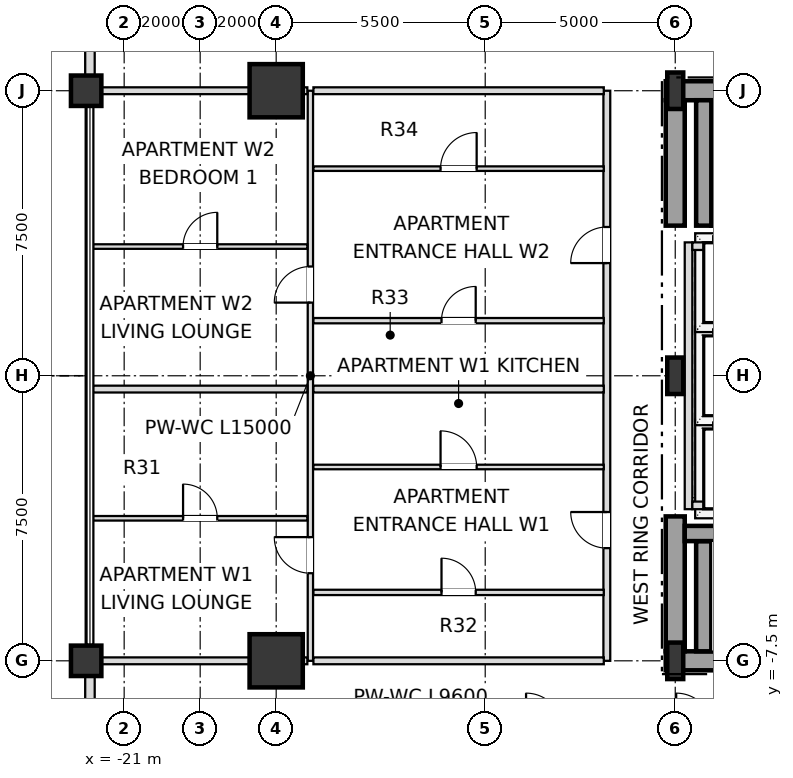
"""IFC4 building model, lengths in metres.
Left out: names, types, materials, properties, quantities, classifications, styles, units other than length and angle.
Written with IfcOpenShell. Run it as: python <this file> out.ifc"""

import sys

from ifc_helpers import new_model, si_unit, direction, frame, frame_2d, origin, origin_2d, place, context, subcontext, project, spatial, rectangle, i_section, extrude, element, fill, save


model = new_model("IFC4")
c1 = context("Model", 3, precision=1e-05, world=origin(), true_north=direction((0.0, 1.0)))
c2 = subcontext(c1, "Body", "Model", "MODEL_VIEW")
j1 = project(units=[si_unit("LENGTHUNIT", "METRE"), si_unit("PLANEANGLEUNIT", "RADIAN")], contexts=[c1])
p1 = place(None, origin())
s1 = spatial("IfcSite", under=j1, at=p1, CompositionType="ELEMENT")
p2 = place(p1, origin())
s2 = spatial("IfcBuilding", under=s1, at=p2, CompositionType="ELEMENT")
p3 = place(p2, frame((0.0, 0.0, 27.6)))
s3 = spatial("IfcBuildingStorey", under=s2, at=p3, CompositionType="ELEMENT", Elevation=27.6)
for number, where, z_axis, x_axis in (
    (1, (-6.5, -7.5, 0.0), (0.0, 0.0, 1.0), (1.0, 0.0, 0.0)),
    (2, (-6.5, 0.0, 0.0), (0.0, 0.0, 1.0), (1.0, 0.0, 0.0)),
    (3, (-6.5, 7.5, 0.0), (0.0, 0.0, 1.0), (1.0, 0.0, 0.0)),
):
    element("IfcColumn", number, at=place(p3, frame(where, z_axis=z_axis, x_axis=x_axis)), inside=s3, PredefinedType="COLUMN", context=c2, shape_type="SweptSolid", body=[
        extrude(i_section(OverallWidth=0.42, OverallDepth=0.96, WebThickness=0.022, FlangeThickness=0.034, at=origin_2d()), origin(), (0.0, 0.0, 1.0), 4.8),
    ])
for number, where, z_axis, x_axis in (
    (4, (-17.0, 7.5, 0.0), (0.0, 0.0, 1.0), (1.0, 0.0, 0.0)),
    (5, (-17.0, -7.5, 0.0), (0.0, 0.0, 1.0), (1.0, 0.0, 0.0)),
):
    element("IfcColumn", number, at=place(p3, frame(where, z_axis=z_axis, x_axis=x_axis)), inside=s3, PredefinedType="USERDEFINED", context=c2, shape_type="SweptSolid", body=[
        extrude(rectangle(XDim=1.4, YDim=1.4, at=origin_2d()), origin(), (0.0, 0.0, 1.0), 4.8),
    ])
for number, where, z_axis, x_axis in (
    (6, (-22.0, -7.5, 0.0), (0.0, 0.0, 1.0), (1.0, 0.0, 0.0)),
    (7, (-22.0, 7.5, 0.0), (0.0, 0.0, 1.0), (1.0, 0.0, 0.0)),
):
    element("IfcColumn", number, at=place(p3, frame(where, z_axis=z_axis, x_axis=x_axis)), inside=s3, PredefinedType="COLUMN", context=c2, shape_type="SweptSolid", body=[
        extrude(rectangle(XDim=0.8, YDim=0.8, at=origin_2d()), origin(), (0.0, 0.0, 1.0), 4.8),
    ])
p4 = place(p3, frame((-21.9, 12.605, 0.0), z_axis=(0.0, 0.0, 1.0), x_axis=(0.0, -1.0, 0.0)))
e8 = element("IfcWall", 8, at=p4, inside=s3, PredefinedType="SOLIDWALL", context=c2, shape_type="SweptSolid", body=[
    extrude(rectangle(XDim=4.71, YDim=0.25, at=frame_2d((2.355, 0.0))), origin(), (0.0, 0.0, 1.0), 3.936),
])
p5 = place(p4, frame((1.455, 0.0, 0.72)))
e9 = element("IfcOpeningElement", 9, at=p5, cuts=e8, PredefinedType="OPENING", context=c2, shape_type="SweptSolid", body=[
    extrude(rectangle(XDim=1.8, YDim=1.68, at=frame_2d((0.9, 0.84))), frame((0.0, 0.135, 0.0), z_axis=(0.0, -1.0, 0.0), x_axis=(1.0, 0.0, 0.0)), (0.0, 0.0, 1.0), 0.27),
])
p6 = place(p3, frame((-21.9, -7.895, 0.0), z_axis=(0.0, 0.0, 1.0), x_axis=(0.0, -1.0, 0.0)))
e10 = element("IfcWall", 10, at=p6, inside=s3, PredefinedType="SOLIDWALL", context=c2, shape_type="SweptSolid", body=[
    extrude(rectangle(XDim=4.71, YDim=0.25, at=frame_2d((2.355, 0.0))), origin(), (0.0, 0.0, 1.0), 3.936),
])
p7 = place(p6, frame((1.455, 0.0, 0.72)))
e11 = element("IfcOpeningElement", 11, at=p7, cuts=e10, PredefinedType="OPENING", context=c2, shape_type="SweptSolid", body=[
    extrude(rectangle(XDim=1.8, YDim=1.68, at=frame_2d((0.9, 0.84))), frame((0.0, 0.135, 0.0), z_axis=(0.0, -1.0, 0.0), x_axis=(1.0, 0.0, 0.0)), (0.0, 0.0, 1.0), 0.27),
])
p8 = place(p3, frame((-6.75, -7.5, 0.0), z_axis=(0.0, 0.0, 1.0), x_axis=(1.0, 0.0, 0.0)))
e12 = element("IfcWall", 12, at=p8, inside=s3, PredefinedType="SHEAR", context=c2, shape_type="SweptSolid", body=[
    extrude(rectangle(XDim=6.75, YDim=0.5, at=frame_2d((3.375, 0.0))), origin(), (0.0, 0.0, 1.0), 4.58),
])
p9 = place(p3, frame((-6.75, 7.5, 0.0), z_axis=(0.0, 0.0, 1.0), x_axis=(1.0, 0.0, 0.0)))
e13 = element("IfcWall", 13, at=p9, inside=s3, PredefinedType="SHEAR", context=c2, shape_type="SweptSolid", body=[
    extrude(rectangle(XDim=6.75, YDim=0.5, at=frame_2d((3.375, 0.0))), origin(), (0.0, 0.0, 1.0), 4.58),
])
p10 = place(p9, frame((1.65, 0.0, 0.0)))
e14 = element("IfcOpeningElement", 14, at=p10, cuts=e13, PredefinedType="OPENING", context=c2, shape_type="SweptSolid", body=[
    extrude(rectangle(XDim=1.05, YDim=2.15, at=frame_2d((0.525, 1.075))), frame((0.0, 0.26, 0.0), z_axis=(0.0, -1.0, 0.0), x_axis=(1.0, 0.0, 0.0)), (0.0, 0.0, 1.0), 0.52),
])
p11 = place(p3, frame((-6.5, -7.25, 0.0), z_axis=(0.0, 0.0, 1.0), x_axis=(0.0, 1.0, 0.0)))
e15 = element("IfcWall", 15, at=p11, inside=s3, PredefinedType="SHEAR", context=c2, shape_type="SweptSolid", body=[
    extrude(rectangle(XDim=3.55, YDim=0.5, at=frame_2d((1.775, 0.0))), origin(), (0.0, 0.0, 1.0), 4.58),
])
p12 = place(p3, frame((-6.5, 3.95, 0.0), z_axis=(0.0, 0.0, 1.0), x_axis=(0.0, 1.0, 0.0)))
e16 = element("IfcWall", 16, at=p12, inside=s3, PredefinedType="SHEAR", context=c2, shape_type="SweptSolid", body=[
    extrude(rectangle(XDim=3.3, YDim=0.5, at=frame_2d((1.65, 0.0))), origin(), (0.0, 0.0, 1.0), 4.58),
])
p13 = place(p3, frame((-5.75, -7.25, 0.0), z_axis=(0.0, 0.0, 1.0), x_axis=(0.0, 1.0, 0.0)))
e17 = element("IfcWall", 17, at=p13, inside=s3, PredefinedType="SHEAR", context=c2, shape_type="SweptSolid", body=[
    extrude(rectangle(XDim=2.9, YDim=0.4, at=frame_2d((1.45, 0.0))), origin(), (0.0, 0.0, 1.0), 4.58),
])
p14 = place(p3, frame((-6.25, -4.15, 0.0), z_axis=(0.0, 0.0, 1.0), x_axis=(1.0, 0.0, 0.0)))
e18 = element("IfcWall", 18, at=p14, inside=s3, PredefinedType="SHEAR", context=c2, shape_type="SweptSolid", body=[
    extrude(rectangle(XDim=7.78, YDim=0.4, at=frame_2d((3.89, 0.0))), origin(), (0.0, 0.0, 1.0), 4.58),
])
p15 = place(p3, frame((-5.55, 4.15, 0.0), z_axis=(0.0, 0.0, 1.0), x_axis=(1.0, 0.0, 0.0)))
e19 = element("IfcWall", 19, at=p15, inside=s3, PredefinedType="SHEAR", context=c2, shape_type="SweptSolid", body=[
    extrude(rectangle(XDim=7.08, YDim=0.4, at=frame_2d((3.54, 0.0))), origin(), (0.0, 0.0, 1.0), 4.58),
])
p16 = place(p3, frame((-5.75, 3.95, 0.0), z_axis=(0.0, 0.0, 1.0), x_axis=(0.0, 1.0, 0.0)))
e20 = element("IfcWall", 20, at=p16, inside=s3, PredefinedType="SHEAR", context=c2, shape_type="SweptSolid", body=[
    extrude(rectangle(XDim=3.3, YDim=0.4, at=frame_2d((1.65, 0.0))), origin(), (0.0, 0.0, 1.0), 4.58),
])
p17 = place(p3, frame((-6.15, -3.51, 0.0), z_axis=(0.0, 0.0, 1.0), x_axis=(0.0, 1.0, 0.0)))
e21 = element("IfcWall", 21, at=p17, inside=s3, PredefinedType="SOLIDWALL", context=c2, shape_type="SweptSolid", body=[
    extrude(rectangle(XDim=7.02, YDim=0.2, at=frame_2d((3.51, 0.0))), origin(), (0.0, 0.0, 1.0), 4.58),
])
for number, where, z_axis, x_axis in (
    (22, (-6.05, -3.41, 0.0), (0.0, 0.0, 1.0), (1.0, 0.0, 0.0)),
    (23, (-6.05, 3.41, 0.0), (0.0, 0.0, 1.0), (1.0, 0.0, 0.0)),
):
    element("IfcWall", number, at=place(p3, frame(where, z_axis=z_axis, x_axis=x_axis)), inside=s3, PredefinedType="SOLIDWALL", context=c2, shape_type="SweptSolid", body=[
        extrude(rectangle(XDim=2.2, YDim=0.2, at=frame_2d((1.1, 0.0))), origin(), (0.0, 0.0, 1.0), 4.58),
    ])
p18 = place(p3, frame((-16.1, -7.5, 0.0), z_axis=(0.0, 0.0, 1.0), x_axis=(0.0, 1.0, 0.0)))
e24 = element("IfcWall", 24, at=p18, inside=s3, PredefinedType="PARTITIONING", context=c2, shape_type="SweptSolid", body=[
    extrude(rectangle(XDim=15.0, YDim=0.14, at=frame_2d((7.5, 0.0))), origin(), (0.0, 0.0, 1.0), 4.58),
])
p19 = place(p18, frame((2.305, 0.0, 0.0)))
e25 = element("IfcOpeningElement", 25, at=p19, cuts=e24, PredefinedType="OPENING", context=c2, shape_type="SweptSolid", body=[
    extrude(rectangle(XDim=0.95, YDim=2.1, at=frame_2d((0.475, 1.05))), frame((0.0, 0.08, 0.0), z_axis=(0.0, -1.0, 0.0), x_axis=(1.0, 0.0, 0.0)), (0.0, 0.0, 1.0), 0.16),
])
p20 = place(p18, frame((9.425, 0.0, 0.0)))
e26 = element("IfcOpeningElement", 26, at=p20, cuts=e24, PredefinedType="OPENING", context=c2, shape_type="SweptSolid", body=[
    extrude(rectangle(XDim=0.95, YDim=2.1, at=frame_2d((0.475, 1.05))), frame((0.0, 0.08, 0.0), z_axis=(0.0, -1.0, 0.0), x_axis=(1.0, 0.0, 0.0)), (0.0, 0.0, 1.0), 0.16),
])
p21 = place(p3, frame((-8.3, -7.5, 0.0), z_axis=(0.0, 0.0, 1.0), x_axis=(0.0, 1.0, 0.0)))
e27 = element("IfcWall", 27, at=p21, inside=s3, PredefinedType="PARTITIONING", context=c2, shape_type="SweptSolid", body=[
    extrude(rectangle(XDim=15.0, YDim=0.18, at=frame_2d((7.5, 0.0))), origin(), (0.0, 0.0, 1.0), 4.58),
])
p22 = place(p21, frame((2.965, 0.0, 0.0)))
e28 = element("IfcOpeningElement", 28, at=p22, cuts=e27, PredefinedType="OPENING", context=c2, shape_type="SweptSolid", body=[
    extrude(rectangle(XDim=0.95, YDim=2.15, at=frame_2d((0.475, 1.075))), frame((0.0, 0.1, 0.0), z_axis=(0.0, -1.0, 0.0), x_axis=(1.0, 0.0, 0.0)), (0.0, 0.0, 1.0), 0.2),
])
p23 = place(p21, frame((10.465, 0.0, 0.0)))
e29 = element("IfcOpeningElement", 29, at=p23, cuts=e27, PredefinedType="OPENING", context=c2, shape_type="SweptSolid", body=[
    extrude(rectangle(XDim=0.95, YDim=2.15, at=frame_2d((0.475, 1.075))), frame((0.0, 0.1, 0.0), z_axis=(0.0, -1.0, 0.0), x_axis=(1.0, 0.0, 0.0)), (0.0, 0.0, 1.0), 0.2),
])
p24 = place(p3, frame((-21.9, -7.5, 0.0), z_axis=(0.0, 0.0, 1.0), x_axis=(1.0, 0.0, 0.0)))
e30 = element("IfcWall", 30, at=p24, inside=s3, PredefinedType="PARTITIONING", context=c2, shape_type="SweptSolid", body=[
    extrude(rectangle(XDim=5.72, YDim=0.18, at=frame_2d((2.86, 0.0))), origin(), (0.0, 0.0, 1.0), 4.016),
])
p25 = place(p3, frame((-16.02, -7.5, 0.0), z_axis=(0.0, 0.0, 1.0), x_axis=(1.0, 0.0, 0.0)))
e31 = element("IfcWall", 31, at=p25, inside=s3, PredefinedType="PARTITIONING", context=c2, shape_type="SweptSolid", body=[
    extrude(rectangle(XDim=7.64, YDim=0.18, at=frame_2d((3.82, 0.0))), origin(), (0.0, 0.0, 1.0), 4.016),
])
p26 = place(p3, frame((-16.02, -5.7, 0.0), z_axis=(0.0, 0.0, 1.0), x_axis=(1.0, 0.0, 0.0)))
e32 = element("IfcWall", 32, at=p26, inside=s3, PredefinedType="PARTITIONING", context=c2, shape_type="SweptSolid", body=[
    extrude(rectangle(XDim=7.64, YDim=0.14, at=frame_2d((3.82, 0.0))), origin(), (0.0, 0.0, 1.0), 4.148),
])
p27 = place(p26, frame((3.37, 0.0, 0.0)))
e33 = element("IfcOpeningElement", 33, at=p27, cuts=e32, PredefinedType="OPENING", context=c2, shape_type="SweptSolid", body=[
    extrude(rectangle(XDim=0.9, YDim=2.1, at=frame_2d((0.45, 1.05))), frame((0.0, 0.08, 0.0), z_axis=(0.0, -1.0, 0.0), x_axis=(1.0, 0.0, 0.0)), (0.0, 0.0, 1.0), 0.16),
])
p28 = place(p3, frame((-21.82, -3.75, 0.0), z_axis=(0.0, 0.0, 1.0), x_axis=(1.0, 0.0, 0.0)))
e34 = element("IfcWall", 34, at=p28, inside=s3, PredefinedType="PARTITIONING", context=c2, shape_type="SweptSolid", body=[
    extrude(rectangle(XDim=5.64, YDim=0.12, at=frame_2d((2.82, 0.0))), origin(), (0.0, 0.0, 1.0), 4.016),
])
p29 = place(p28, frame((2.37, 0.0, 0.0)))
e35 = element("IfcOpeningElement", 35, at=p29, cuts=e34, PredefinedType="OPENING", context=c2, shape_type="SweptSolid", body=[
    extrude(rectangle(XDim=0.9, YDim=2.1, at=frame_2d((0.45, 1.05))), frame((0.0, 0.07, 0.0), z_axis=(0.0, -1.0, 0.0), x_axis=(1.0, 0.0, 0.0)), (0.0, 0.0, 1.0), 0.14),
])
p30 = place(p3, frame((-16.02, -2.4, 0.0), z_axis=(0.0, 0.0, 1.0), x_axis=(1.0, 0.0, 0.0)))
e36 = element("IfcWall", 36, at=p30, inside=s3, PredefinedType="PARTITIONING", context=c2, shape_type="SweptSolid", body=[
    extrude(rectangle(XDim=7.64, YDim=0.12, at=frame_2d((3.82, 0.0))), origin(), (0.0, 0.0, 1.0), 4.148),
])
p31 = place(p30, frame((3.345, 0.0, 0.0)))
e37 = element("IfcOpeningElement", 37, at=p31, cuts=e36, PredefinedType="OPENING", context=c2, shape_type="SweptSolid", body=[
    extrude(rectangle(XDim=0.95, YDim=2.1, at=frame_2d((0.475, 1.05))), frame((0.0, 0.07, 0.0), z_axis=(0.0, -1.0, 0.0), x_axis=(1.0, 0.0, 0.0)), (0.0, 0.0, 1.0), 0.14),
])
p32 = place(p3, frame((-21.82, -0.35, 0.0), z_axis=(0.0, 0.0, 1.0), x_axis=(1.0, 0.0, 0.0)))
e38 = element("IfcWall", 38, at=p32, inside=s3, PredefinedType="PARTITIONING", context=c2, shape_type="SweptSolid", body=[
    extrude(rectangle(XDim=5.64, YDim=0.18, at=frame_2d((2.82, 0.0))), origin(), (0.0, 0.0, 1.0), 4.016),
])
p33 = place(p3, frame((-16.02, -0.35, 0.0), z_axis=(0.0, 0.0, 1.0), x_axis=(1.0, 0.0, 0.0)))
e39 = element("IfcWall", 39, at=p33, inside=s3, PredefinedType="PARTITIONING", context=c2, shape_type="SweptSolid", body=[
    extrude(rectangle(XDim=7.64, YDim=0.18, at=frame_2d((3.82, 0.0))), origin(), (0.0, 0.0, 1.0), 4.148),
])
p34 = place(p3, frame((-16.02, 1.45, 0.0), z_axis=(0.0, 0.0, 1.0), x_axis=(1.0, 0.0, 0.0)))
e40 = element("IfcWall", 40, at=p34, inside=s3, PredefinedType="PARTITIONING", context=c2, shape_type="SweptSolid", body=[
    extrude(rectangle(XDim=7.64, YDim=0.14, at=frame_2d((3.82, 0.0))), origin(), (0.0, 0.0, 1.0), 4.148),
])
p35 = place(p34, frame((3.37, 0.0, 0.0)))
e41 = element("IfcOpeningElement", 41, at=p35, cuts=e40, PredefinedType="OPENING", context=c2, shape_type="SweptSolid", body=[
    extrude(rectangle(XDim=0.9, YDim=2.1, at=frame_2d((0.45, 1.05))), frame((0.0, 0.08, 0.0), z_axis=(0.0, -1.0, 0.0), x_axis=(1.0, 0.0, 0.0)), (0.0, 0.0, 1.0), 0.16),
])
p36 = place(p3, frame((-21.82, 3.4, 0.0), z_axis=(0.0, 0.0, 1.0), x_axis=(1.0, 0.0, 0.0)))
e42 = element("IfcWall", 42, at=p36, inside=s3, PredefinedType="PARTITIONING", context=c2, shape_type="SweptSolid", body=[
    extrude(rectangle(XDim=5.64, YDim=0.12, at=frame_2d((2.82, 0.0))), origin(), (0.0, 0.0, 1.0), 4.016),
])
p37 = place(p36, frame((2.37, 0.0, 0.0)))
e43 = element("IfcOpeningElement", 43, at=p37, cuts=e42, PredefinedType="OPENING", context=c2, shape_type="SweptSolid", body=[
    extrude(rectangle(XDim=0.9, YDim=2.1, at=frame_2d((0.45, 1.05))), frame((0.0, 0.07, 0.0), z_axis=(0.0, -1.0, 0.0), x_axis=(1.0, 0.0, 0.0)), (0.0, 0.0, 1.0), 0.14),
])
p38 = place(p3, frame((-16.02, 5.45, 0.0), z_axis=(0.0, 0.0, 1.0), x_axis=(1.0, 0.0, 0.0)))
e44 = element("IfcWall", 44, at=p38, inside=s3, PredefinedType="PARTITIONING", context=c2, shape_type="SweptSolid", body=[
    extrude(rectangle(XDim=7.64, YDim=0.12, at=frame_2d((3.82, 0.0))), origin(), (0.0, 0.0, 1.0), 4.148),
])
p39 = place(p38, frame((3.345, 0.0, 0.0)))
e45 = element("IfcOpeningElement", 45, at=p39, cuts=e44, PredefinedType="OPENING", context=c2, shape_type="SweptSolid", body=[
    extrude(rectangle(XDim=0.95, YDim=2.1, at=frame_2d((0.475, 1.05))), frame((0.0, 0.07, 0.0), z_axis=(0.0, -1.0, 0.0), x_axis=(1.0, 0.0, 0.0)), (0.0, 0.0, 1.0), 0.14),
])
p40 = place(p3, frame((-21.9, 7.5, 0.0), z_axis=(0.0, 0.0, 1.0), x_axis=(1.0, 0.0, 0.0)))
e46 = element("IfcWall", 46, at=p40, inside=s3, PredefinedType="PARTITIONING", context=c2, shape_type="SweptSolid", body=[
    extrude(rectangle(XDim=5.72, YDim=0.18, at=frame_2d((2.86, 0.0))), origin(), (0.0, 0.0, 1.0), 4.016),
])
p41 = place(p3, frame((-16.02, 7.5, 0.0), z_axis=(0.0, 0.0, 1.0), x_axis=(1.0, 0.0, 0.0)))
e47 = element("IfcWall", 47, at=p41, inside=s3, PredefinedType="PARTITIONING", context=c2, shape_type="SweptSolid", body=[
    extrude(rectangle(XDim=7.64, YDim=0.18, at=frame_2d((3.82, 0.0))), origin(), (0.0, 0.0, 1.0), 4.016),
])
p42 = place(p27, origin())
e48 = element("IfcDoor", 48, at=p42, inside=s3, OperationType="SINGLE_SWING_LEFT", PredefinedType="DOOR", context=c2, shape_type="SweptSolid", body=[
    extrude(rectangle(XDim=0.9, YDim=2.1, at=frame_2d((0.45, 1.05))), frame((0.0, 0.025, 0.0), z_axis=(0.0, -1.0, 0.0), x_axis=(1.0, 0.0, 0.0)), (0.0, 0.0, 1.0), 0.05),
])
fill(e33, e48)
p43 = place(p22, origin())
e49 = element("IfcDoor", 49, at=p43, inside=s3, OperationType="SINGLE_SWING_RIGHT", PredefinedType="DOOR", context=c2, shape_type="SweptSolid", body=[
    extrude(rectangle(XDim=0.95, YDim=2.15, at=frame_2d((0.475, 1.075))), frame((0.0, 0.025, 0.0), z_axis=(0.0, -1.0, 0.0), x_axis=(1.0, 0.0, 0.0)), (0.0, 0.0, 1.0), 0.05),
])
fill(e28, e49)
p44 = place(p31, origin())
e50 = element("IfcDoor", 50, at=p44, inside=s3, OperationType="SINGLE_SWING_LEFT", PredefinedType="DOOR", context=c2, shape_type="SweptSolid", body=[
    extrude(rectangle(XDim=0.95, YDim=2.1, at=frame_2d((0.475, 1.05))), frame((0.0, 0.025, 0.0), z_axis=(0.0, -1.0, 0.0), x_axis=(1.0, 0.0, 0.0)), (0.0, 0.0, 1.0), 0.05),
])
fill(e37, e50)
p45 = place(p19, origin())
e51 = element("IfcDoor", 51, at=p45, inside=s3, OperationType="SINGLE_SWING_RIGHT", PredefinedType="DOOR", context=c2, shape_type="SweptSolid", body=[
    extrude(rectangle(XDim=0.95, YDim=2.1, at=frame_2d((0.475, 1.05))), frame((0.0, 0.025, 0.0), z_axis=(0.0, -1.0, 0.0), x_axis=(1.0, 0.0, 0.0)), (0.0, 0.0, 1.0), 0.05),
])
fill(e25, e51)
p46 = place(p29, origin())
e52 = element("IfcDoor", 52, at=p46, inside=s3, OperationType="SINGLE_SWING_LEFT", PredefinedType="DOOR", context=c2, shape_type="SweptSolid", body=[
    extrude(rectangle(XDim=0.9, YDim=2.1, at=frame_2d((0.45, 1.05))), frame((0.0, 0.025, 0.0), z_axis=(0.0, -1.0, 0.0), x_axis=(1.0, 0.0, 0.0)), (0.0, 0.0, 1.0), 0.05),
])
fill(e35, e52)
p47 = place(p35, origin())
e53 = element("IfcDoor", 53, at=p47, inside=s3, OperationType="SINGLE_SWING_RIGHT", PredefinedType="DOOR", context=c2, shape_type="SweptSolid", body=[
    extrude(rectangle(XDim=0.9, YDim=2.1, at=frame_2d((0.45, 1.05))), frame((0.0, 0.025, 0.0), z_axis=(0.0, -1.0, 0.0), x_axis=(1.0, 0.0, 0.0)), (0.0, 0.0, 1.0), 0.05),
])
fill(e41, e53)
p48 = place(p23, origin())
e54 = element("IfcDoor", 54, at=p48, inside=s3, OperationType="SINGLE_SWING_LEFT", PredefinedType="DOOR", context=c2, shape_type="SweptSolid", body=[
    extrude(rectangle(XDim=0.95, YDim=2.15, at=frame_2d((0.475, 1.075))), frame((0.0, 0.025, 0.0), z_axis=(0.0, -1.0, 0.0), x_axis=(1.0, 0.0, 0.0)), (0.0, 0.0, 1.0), 0.05),
])
fill(e29, e54)
p49 = place(p39, origin())
e55 = element("IfcDoor", 55, at=p49, inside=s3, OperationType="SINGLE_SWING_RIGHT", PredefinedType="DOOR", context=c2, shape_type="SweptSolid", body=[
    extrude(rectangle(XDim=0.95, YDim=2.1, at=frame_2d((0.475, 1.05))), frame((0.0, 0.025, 0.0), z_axis=(0.0, -1.0, 0.0), x_axis=(1.0, 0.0, 0.0)), (0.0, 0.0, 1.0), 0.05),
])
fill(e45, e55)
p50 = place(p20, origin())
e56 = element("IfcDoor", 56, at=p50, inside=s3, OperationType="SINGLE_SWING_LEFT", PredefinedType="DOOR", context=c2, shape_type="SweptSolid", body=[
    extrude(rectangle(XDim=0.95, YDim=2.1, at=frame_2d((0.475, 1.05))), frame((0.0, 0.025, 0.0), z_axis=(0.0, -1.0, 0.0), x_axis=(1.0, 0.0, 0.0)), (0.0, 0.0, 1.0), 0.05),
])
fill(e26, e56)
p51 = place(p37, origin())
e57 = element("IfcDoor", 57, at=p51, inside=s3, OperationType="SINGLE_SWING_RIGHT", PredefinedType="DOOR", context=c2, shape_type="SweptSolid", body=[
    extrude(rectangle(XDim=0.9, YDim=2.1, at=frame_2d((0.45, 1.05))), frame((0.0, 0.025, 0.0), z_axis=(0.0, -1.0, 0.0), x_axis=(1.0, 0.0, 0.0)), (0.0, 0.0, 1.0), 0.05),
])
fill(e43, e57)
save(model, sys.argv[1])
